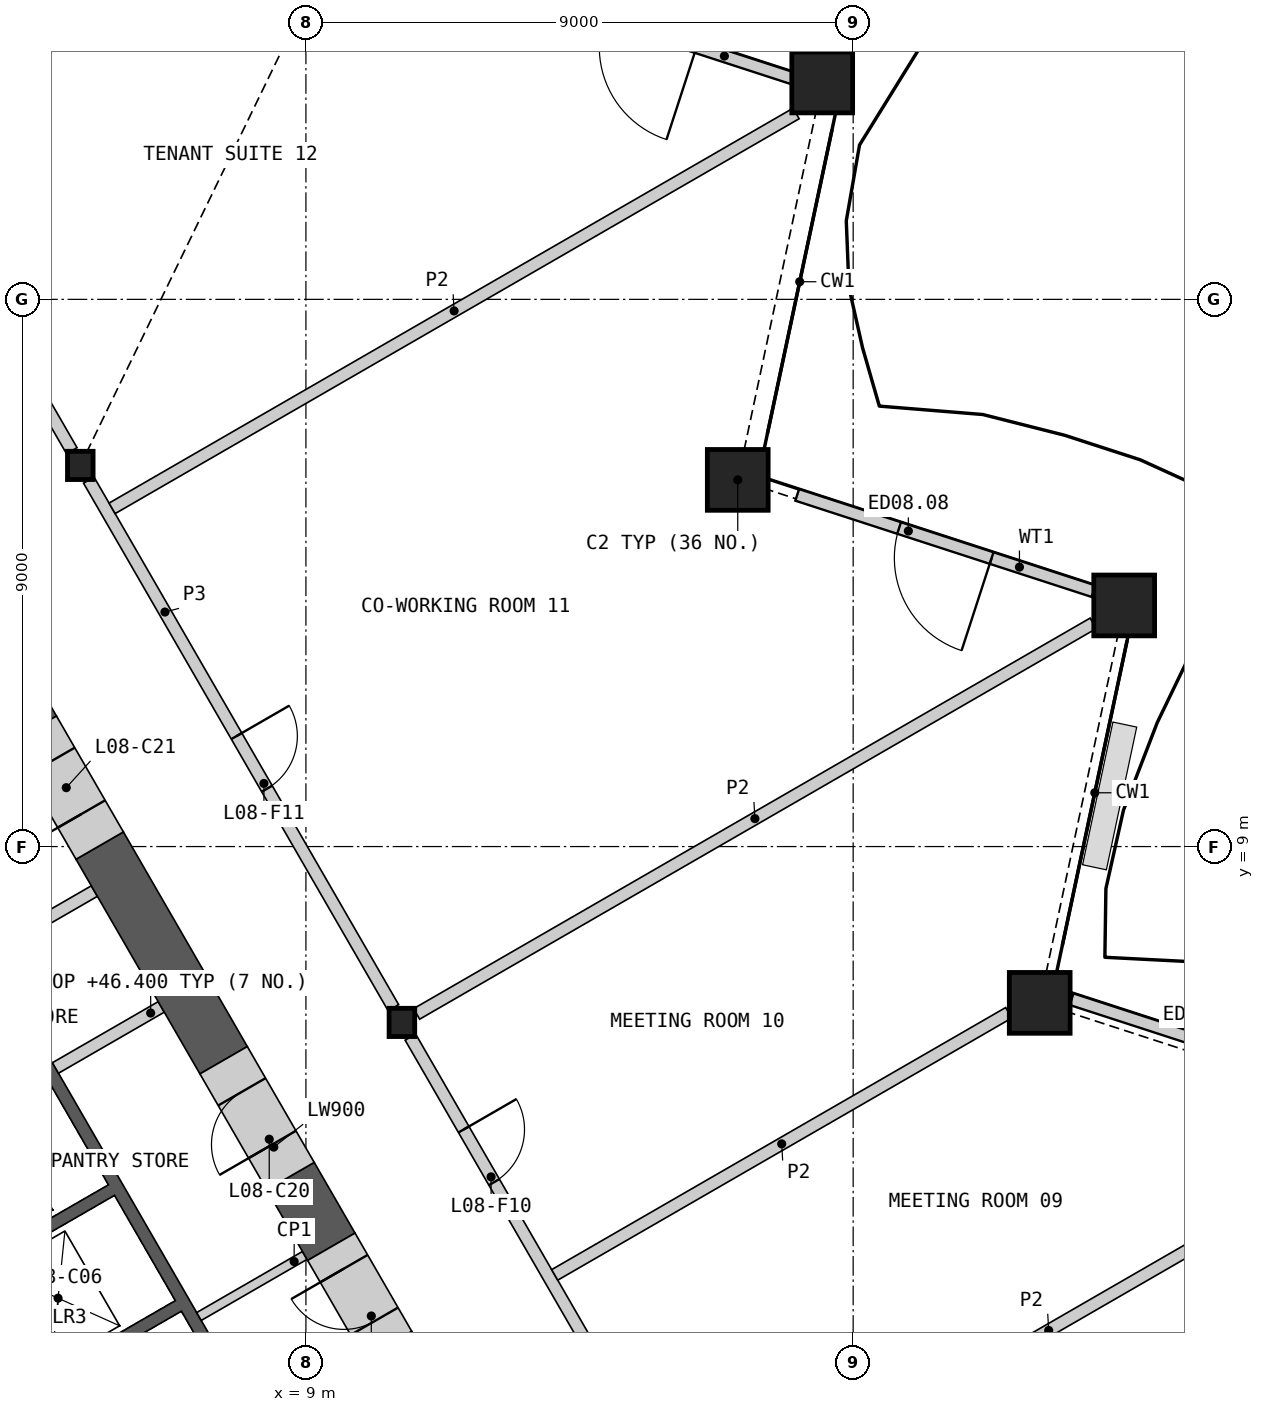
"""IFC4 building model, lengths in metres.
Left out: names, types, materials, properties, quantities, classifications, styles, units other than length and angle.
Written with IfcOpenShell. Run it as: python <this file> out.ifc"""

import sys

from ifc_helpers import new_model, si_unit, direction, frame, frame_2d, origin, origin_2d, place, context, subcontext, project, spatial, polyline, rectangle, hollow_rectangle, i_section, outline, extrude, element, fill, save


model = new_model("IFC4")
c1 = context("Model", 3, precision=1e-05, world=origin(), true_north=direction((0.0, 1.0)))
c2 = subcontext(c1, "Body", "Model", "MODEL_VIEW")
j1 = project(units=[si_unit("LENGTHUNIT", "METRE"), si_unit("PLANEANGLEUNIT", "RADIAN")], contexts=[c1])
p1 = place(None, origin())
s1 = spatial("IfcSite", under=j1, at=p1, CompositionType="ELEMENT")
p2 = place(p1, origin())
s2 = spatial("IfcBuilding", under=s1, at=p2, CompositionType="ELEMENT")
p3 = place(p2, frame((0.0, 0.0, 42.6)))
s3 = spatial("IfcBuildingStorey", under=s2, at=p3, CompositionType="ELEMENT", Elevation=42.6)
for number, where, z_axis, x_axis in (
    (1, (21.068, 6.429, 0.0), (0.0, 0.0, 1.0), (1.0, 0.0, 0.0)),
    (2, (22.457, 12.966, 0.0), (0.0, 0.0, 1.0), (1.0, 0.0, 0.0)),
    (3, (16.102, 15.031, 0.0), (0.0, 0.0, 1.0), (1.0, 0.0, 0.0)),
    (4, (17.491, 21.567, 0.0), (0.0, 0.0, 1.0), (1.0, 0.0, 0.0)),
):
    element("IfcColumn", number, at=place(p3, frame(where, z_axis=z_axis, x_axis=x_axis)), inside=s3, PredefinedType="COLUMN", context=c2, shape_type="SweptSolid", body=[
        extrude(hollow_rectangle(XDim=1.0, YDim=1.0, WallThickness=0.07, at=origin_2d()), origin(), (0.0, 0.0, 1.0), 4.2),
    ])
for number, where, z_axis, x_axis in (
    (5, (10.578, 6.107, 0.0), (0.0, 0.0, 1.0), (1.0, 0.0, 0.0)),
    (6, (5.289, 15.269, 0.0), (0.0, 0.0, 1.0), (1.0, 0.0, 0.0)),
):
    element("IfcColumn", number, at=place(p3, frame(where, z_axis=z_axis, x_axis=x_axis)), inside=s3, PredefinedType="COLUMN", context=c2, shape_type="SweptSolid", body=[
        extrude(i_section(OverallWidth=0.421, OverallDepth=0.465, WebThickness=0.045, FlangeThickness=0.072, at=origin_2d()), origin(), (0.0, 0.0, 1.0), 4.2),
    ])
p4 = place(p3, frame((26.899, 4.765, 0.0), z_axis=(0.0, 0.0, 1.0), x_axis=(-0.951054004345, 0.309024725255, 0.0)))
e7 = element("IfcWall", 7, at=p4, inside=s3, PredefinedType="SOLIDWALL", context=c2, shape_type="SweptSolid", body=[
    extrude(rectangle(XDim=5.579, YDim=0.2, at=frame_2d((2.79, 0.0))), origin(), (0.0, 0.0, 1.0), 3.189),
])
p5 = place(p4, frame((1.86, 0.0, 0.0)))
e8 = element("IfcOpeningElement", 8, at=p5, cuts=e7, PredefinedType="OPENING", context=c2, shape_type="SweptSolid", body=[
    extrude(rectangle(XDim=1.6, YDim=2.4, at=frame_2d((0.8, 1.2))), frame((0.0, 0.11, 0.0), z_axis=(0.0, -1.0, 0.0), x_axis=(1.0, 0.0, 0.0)), (0.0, 0.0, 1.0), 0.22),
])
p6 = place(p3, frame((21.953, 13.2, 0.0), z_axis=(0.0, 0.0, 1.0), x_axis=(-0.951052624268, 0.309028972547, 0.0)))
e9 = element("IfcWall", 9, at=p6, inside=s3, PredefinedType="SOLIDWALL", context=c2, shape_type="SweptSolid", body=[
    extrude(rectangle(XDim=5.124, YDim=0.2, at=frame_2d((2.562, 0.0))), origin(), (0.0, 0.0, 1.0), 3.189),
])
p7 = place(p6, frame((1.762, 0.0, 0.0)))
e10 = element("IfcOpeningElement", 10, at=p7, cuts=e9, PredefinedType="OPENING", context=c2, shape_type="SweptSolid", body=[
    extrude(rectangle(XDim=1.6, YDim=2.4, at=frame_2d((0.8, 1.2))), frame((0.0, 0.11, 0.0), z_axis=(0.0, -1.0, 0.0), x_axis=(1.0, 0.0, 0.0)), (0.0, 0.0, 1.0), 0.22),
])
p8 = place(p3, frame((17.1, 21.605, 0.0), z_axis=(0.0, 0.0, 1.0), x_axis=(-0.951048073862, 0.309042976306, 0.0)))
e11 = element("IfcWall", 11, at=p8, inside=s3, PredefinedType="SOLIDWALL", context=c2, shape_type="SweptSolid", body=[
    extrude(rectangle(XDim=5.124, YDim=0.2, at=frame_2d((2.562, 0.0))), origin(), (0.0, 0.0, 1.0), 3.189),
])
p9 = place(p8, frame((1.762, 0.0, 0.0)))
e12 = element("IfcOpeningElement", 12, at=p9, cuts=e11, PredefinedType="OPENING", context=c2, shape_type="SweptSolid", body=[
    extrude(rectangle(XDim=1.6, YDim=2.4, at=frame_2d((0.8, 1.2))), frame((0.0, 0.11, 0.0), z_axis=(0.0, -1.0, 0.0), x_axis=(1.0, 0.0, 0.0)), (0.0, 0.0, 1.0), 0.22),
])
p10 = place(p3, origin())
e13 = element("IfcWall", 13, at=p10, inside=s3, PredefinedType="SHEAR", context=c2, shape_type="SweptSolid", body=[
    extrude(outline(polyline([(2.66, 4.192), (4.831, 5.445), (8.231, -0.444), (6.061, -1.697), (5.96, -1.524), (7.952, -0.374), (6.952, 1.358), (4.96, 0.208), (4.861, 0.381), (6.852, 1.531), (5.852, 3.263), (3.861, 2.113), (3.76, 2.287), (5.752, 3.437), (4.752, 5.169), (2.76, 4.019), (2.66, 4.192)])), origin(), (0.0, 0.0, 1.0), 3.8),
])
p11 = place(p3, frame((5.817, -1.476, 0.0), z_axis=(0.0, 0.0, 1.0), x_axis=(-0.500002616675, 0.866023893041, 0.0)))
e14 = element("IfcWall", 14, at=p11, inside=s3, PredefinedType="SOLIDWALL", context=c2, shape_type="SweptSolid", body=[
    extrude(rectangle(XDim=8.373, YDim=0.2, at=frame_2d((4.187, 0.0))), origin(), (0.0, 0.0, 1.0), 3.8),
])
p12 = place(p11, frame((0.337, 0.0, 0.0)))
e15 = element("IfcOpeningElement", 15, at=p12, cuts=e14, PredefinedType="OPENING", context=c2, shape_type="SweptSolid", body=[
    extrude(rectangle(XDim=1.1, YDim=2.1, at=frame_2d((0.55, 1.05))), frame((0.0, 0.11, 0.0), z_axis=(0.0, -1.0, 0.0), x_axis=(1.0, 0.0, 0.0)), (0.0, 0.0, 1.0), 0.22),
])
p13 = place(p11, frame((2.537, 0.0, 0.0)))
e16 = element("IfcOpeningElement", 16, at=p13, cuts=e14, PredefinedType="OPENING", context=c2, shape_type="SweptSolid", body=[
    extrude(rectangle(XDim=1.1, YDim=2.1, at=frame_2d((0.55, 1.05))), frame((0.0, 0.11, 0.0), z_axis=(0.0, -1.0, 0.0), x_axis=(1.0, 0.0, 0.0)), (0.0, 0.0, 1.0), 0.22),
])
p14 = place(p11, frame((4.737, 0.0, 0.0)))
e17 = element("IfcOpeningElement", 17, at=p14, cuts=e14, PredefinedType="OPENING", context=c2, shape_type="SweptSolid", body=[
    extrude(rectangle(XDim=1.1, YDim=2.1, at=frame_2d((0.55, 1.05))), frame((0.0, 0.11, 0.0), z_axis=(0.0, -1.0, 0.0), x_axis=(1.0, 0.0, 0.0)), (0.0, 0.0, 1.0), 0.22),
])
p15 = place(p11, frame((7.037, 0.0, 0.0)))
e18 = element("IfcOpeningElement", 18, at=p15, cuts=e14, PredefinedType="OPENING", context=c2, shape_type="SweptSolid", body=[
    extrude(rectangle(XDim=0.9, YDim=2.1, at=frame_2d((0.45, 1.05))), frame((0.0, 0.11, 0.0), z_axis=(0.0, -1.0, 0.0), x_axis=(1.0, 0.0, 0.0)), (0.0, 0.0, 1.0), 0.22),
])
p16 = place(p3, frame((4.881, 5.358, 0.0), z_axis=(0.0, 0.0, 1.0), x_axis=(0.866035824272, 0.499981950752, 0.0)))
e19 = element("IfcWall", 19, at=p16, inside=s3, PredefinedType="SHEAR", context=c2, shape_type="SweptSolid", body=[
    extrude(rectangle(XDim=2.009, YDim=0.2, at=frame_2d((1.004, 0.0))), origin(), (0.0, 0.0, 1.0), 3.8),
])
p17 = place(p3, frame((3.781, 7.263, 0.0), z_axis=(0.0, 0.0, 1.0), x_axis=(0.865983199114, 0.50007309351, 0.0)))
e20 = element("IfcWall", 20, at=p17, inside=s3, PredefinedType="SHEAR", context=c2, shape_type="SweptSolid", body=[
    extrude(rectangle(XDim=2.009, YDim=0.2, at=frame_2d((1.004, 0.0))), origin(), (0.0, 0.0, 1.0), 3.8),
])
p18 = place(p3, frame((8.981, 2.275, 0.0), z_axis=(0.0, 0.0, 1.0), x_axis=(-0.866013584312, -0.500020471368, 0.0)))
e21 = element("IfcWall", 21, at=p18, inside=s3, PredefinedType="PARTITIONING", context=c2, shape_type="SweptSolid", body=[
    extrude(rectangle(XDim=2.009, YDim=0.15, at=frame_2d((1.005, 0.0))), origin(), (0.0, 0.0, 1.0), 3.8),
])
p19 = place(p3, frame((7.646, 5.486, 0.0), z_axis=(0.0, 0.0, 1.0), x_axis=(-0.499978218965, 0.866037978706, 0.0)))
e22 = element("IfcWall", 22, at=p19, inside=s3, PredefinedType="SHEAR", context=c2, shape_type="SweptSolid", body=[
    extrude(rectangle(XDim=4.076, YDim=0.9, at=frame_2d((2.038, 0.0))), origin(), (0.0, 0.0, 1.0), 3.8),
])
p20 = place(p3, frame((4.509, 10.921, 0.0), z_axis=(0.0, 0.0, 1.0), x_axis=(-0.49999004381, 0.866031151917, 0.0)))
e23 = element("IfcWall", 23, at=p20, inside=s3, PredefinedType="SHEAR", context=c2, shape_type="SweptSolid", body=[
    extrude(rectangle(XDim=3.975, YDim=0.9, at=frame_2d((1.988, 0.0))), origin(), (0.0, 0.0, 1.0), 3.8),
])
p21 = place(p3, frame((11.755, -1.63, 0.0), z_axis=(0.0, 0.0, 1.0), x_axis=(-0.499943114462, 0.866058244174, 0.0)))
e24 = element("IfcWall", 24, at=p21, inside=s3, PredefinedType="SHEAR", context=c2, shape_type="SweptSolid", body=[
    extrude(rectangle(XDim=2.809, YDim=0.9, at=frame_2d((1.405, 0.0))), origin(), (0.0, 0.0, 1.0), 3.8),
])
p22 = place(p3, frame((9.418, 2.418, 0.0), z_axis=(0.0, 0.0, 1.0), x_axis=(-0.49995335277, 0.8660523339, 0.0)))
e25 = element("IfcWall", 25, at=p22, inside=s3, PredefinedType="SHEAR", context=c2, shape_type="SweptSolid", body=[
    extrude(rectangle(XDim=1.343, YDim=0.9, at=frame_2d((0.671, 0.0))), origin(), (0.0, 0.0, 1.0), 3.8),
])
p23 = place(p3, frame((10.35, 0.803, 0.0), z_axis=(0.0, 0.0, 1.0), x_axis=(-0.500081290722, 0.865978465477, 0.0)))
e26 = element("IfcWall", 26, at=p23, inside=s3, PredefinedType="SHEAR", context=c2, shape_type="SweptSolid", body=[
    extrude(rectangle(XDim=1.865, YDim=0.9, at=frame_2d((0.933, 0.0))), origin(), (0.0, 0.0, 1.0), 3.8),
])
p24 = place(p23, frame((0.45, 0.0, 0.0)))
e27 = element("IfcOpeningElement", 27, at=p24, cuts=e26, PredefinedType="OPENING", context=c2, shape_type="SweptSolid", body=[
    extrude(rectangle(XDim=1.0, YDim=2.1, at=frame_2d((0.5, 1.05))), frame((0.0, 0.46, 0.0), z_axis=(0.0, -1.0, 0.0), x_axis=(1.0, 0.0, 0.0)), (0.0, 0.0, 1.0), 0.92),
])
p25 = place(p3, frame((8.747, 3.58, 0.0), z_axis=(0.0, 0.0, 1.0), x_axis=(-0.50002983664, 0.866008176907, 0.0)))
e28 = element("IfcWall", 28, at=p25, inside=s3, PredefinedType="SHEAR", context=c2, shape_type="SweptSolid", body=[
    extrude(rectangle(XDim=2.2, YDim=0.9, at=frame_2d((1.1, 0.0))), origin(), (0.0, 0.0, 1.0), 3.8),
])
p26 = place(p25, frame((0.6, 0.0, 0.0)))
e29 = element("IfcOpeningElement", 29, at=p26, cuts=e28, PredefinedType="OPENING", context=c2, shape_type="SweptSolid", body=[
    extrude(rectangle(XDim=1.0, YDim=2.1, at=frame_2d((0.5, 1.05))), frame((0.0, 0.46, 0.0), z_axis=(0.0, -1.0, 0.0), x_axis=(1.0, 0.0, 0.0)), (0.0, 0.0, 1.0), 0.92),
])
p27 = place(p3, frame((5.608, 9.016, 0.0), z_axis=(0.0, 0.0, 1.0), x_axis=(-0.499994660107, 0.866028486751, 0.0)))
e30 = element("IfcWall", 30, at=p27, inside=s3, PredefinedType="SHEAR", context=c2, shape_type="SweptSolid", body=[
    extrude(rectangle(XDim=2.2, YDim=0.9, at=frame_2d((1.1, 0.0))), origin(), (0.0, 0.0, 1.0), 3.8),
])
p28 = place(p27, frame((0.6, 0.0, 0.0)))
e31 = element("IfcOpeningElement", 31, at=p28, cuts=e30, PredefinedType="OPENING", context=c2, shape_type="SweptSolid", body=[
    extrude(rectangle(XDim=1.0, YDim=2.1, at=frame_2d((0.5, 1.05))), frame((0.0, 0.46, 0.0), z_axis=(0.0, -1.0, 0.0), x_axis=(1.0, 0.0, 0.0)), (0.0, 0.0, 1.0), 0.92),
])
p29 = place(p3, frame((10.719, 5.865, 0.0), z_axis=(0.0, 0.0, 1.0), x_axis=(0.49999175339, -0.866030164915, 0.0)))
e32 = element("IfcWall", 32, at=p29, inside=s3, PredefinedType="PARTITIONING", context=c2, shape_type="SweptSolid", body=[
    extrude(rectangle(XDim=10.019, YDim=0.2, at=frame_2d((5.009, 0.0))), origin(), (0.0, 0.0, 1.0), 3.8),
])
p30 = place(p29, frame((6.464, 0.0, 0.0)))
e33 = element("IfcOpeningElement", 33, at=p30, cuts=e32, PredefinedType="OPENING", context=c2, shape_type="SweptSolid", body=[
    extrude(rectangle(XDim=1.0, YDim=2.1, at=frame_2d((0.5, 1.05))), frame((0.0, 0.11, 0.0), z_axis=(0.0, -1.0, 0.0), x_axis=(1.0, 0.0, 0.0)), (0.0, 0.0, 1.0), 0.22),
])
p31 = place(p29, frame((1.753, 0.0, 0.0)))
e34 = element("IfcOpeningElement", 34, at=p31, cuts=e32, PredefinedType="OPENING", context=c2, shape_type="SweptSolid", body=[
    extrude(rectangle(XDim=1.0, YDim=2.1, at=frame_2d((0.5, 1.05))), frame((0.0, 0.11, 0.0), z_axis=(0.0, -1.0, 0.0), x_axis=(1.0, 0.0, 0.0)), (0.0, 0.0, 1.0), 0.22),
])
p32 = place(p3, frame((5.429, 15.026, 0.0), z_axis=(0.0, 0.0, 1.0), x_axis=(0.50001002959, -0.86601961312, 0.0)))
e35 = element("IfcWall", 35, at=p32, inside=s3, PredefinedType="PARTITIONING", context=c2, shape_type="SweptSolid", body=[
    extrude(rectangle(XDim=10.019, YDim=0.2, at=frame_2d((5.009, 0.0))), origin(), (0.0, 0.0, 1.0), 3.8),
])
p33 = place(p32, frame((4.86, 0.0, 0.0)))
e36 = element("IfcOpeningElement", 36, at=p33, cuts=e35, PredefinedType="OPENING", context=c2, shape_type="SweptSolid", body=[
    extrude(rectangle(XDim=1.0, YDim=2.1, at=frame_2d((0.5, 1.05))), frame((0.0, 0.11, 0.0), z_axis=(0.0, -1.0, 0.0), x_axis=(1.0, 0.0, 0.0)), (0.0, 0.0, 1.0), 0.22),
])
p34 = place(p3, frame((1.913, 21.116, 0.0), z_axis=(0.0, 0.0, 1.0), x_axis=(0.500001069878, -0.866024786089, 0.0)))
e37 = element("IfcWall", 37, at=p34, inside=s3, PredefinedType="PARTITIONING", context=c2, shape_type="SweptSolid", body=[
    extrude(rectangle(XDim=6.473, YDim=0.2, at=frame_2d((3.236, 0.0))), origin(), (0.0, 0.0, 1.0), 3.8),
])
p35 = place(p34, frame((2.787, 0.0, 0.0)))
e38 = element("IfcOpeningElement", 38, at=p35, cuts=e37, PredefinedType="OPENING", context=c2, shape_type="SweptSolid", body=[
    extrude(rectangle(XDim=1.0, YDim=2.1, at=frame_2d((0.5, 1.05))), frame((0.0, 0.11, 0.0), z_axis=(0.0, -1.0, 0.0), x_axis=(1.0, 0.0, 0.0)), (0.0, 0.0, 1.0), 0.22),
])
p36 = place(p3, frame((2.041, 21.093, 0.0), z_axis=(0.0, 0.0, 1.0), x_axis=(0.778730857737, 0.627358152261, 0.0)))
e39 = element("IfcWall", 39, at=p36, inside=s3, PredefinedType="PARTITIONING", context=c2, shape_type="SweptSolid", body=[
    extrude(rectangle(XDim=13.654, YDim=0.2, at=frame_2d((6.827, 0.0))), origin(), (0.0, 0.0, 1.0), 2.885),
])
p37 = place(p3, frame((15.518, -2.248, 0.0), z_axis=(0.0, 0.0, 1.0), x_axis=(0.866025231175, 0.500000298968, 0.0)))
e40 = element("IfcWall", 40, at=p37, inside=s3, PredefinedType="PARTITIONING", context=c2, shape_type="SweptSolid", body=[
    extrude(rectangle(XDim=13.159, YDim=0.2, at=frame_2d((6.579, 0.0))), origin(), (0.0, 0.0, 1.0), 2.885),
])
p38 = place(p3, frame((5.812, 14.562, 0.0), z_axis=(0.0, 0.0, 1.0), x_axis=(0.866020631549, 0.500008265664, 0.0)))
e41 = element("IfcWall", 41, at=p38, inside=s3, PredefinedType="PARTITIONING", context=c2, shape_type="SweptSolid", body=[
    extrude(rectangle(XDim=12.989, YDim=0.2, at=frame_2d((6.495, 0.0))), origin(), (0.0, 0.0, 1.0), 2.885),
])
p39 = place(p3, frame((10.821, 6.247, 0.0), z_axis=(0.0, 0.0, 1.0), x_axis=(0.866026729935, 0.499997703033, 0.0)))
e42 = element("IfcWall", 42, at=p39, inside=s3, PredefinedType="PARTITIONING", context=c2, shape_type="SweptSolid", body=[
    extrude(rectangle(XDim=12.848, YDim=0.2, at=frame_2d((6.424, 0.0))), origin(), (0.0, 0.0, 1.0), 2.885),
])
p40 = place(p3, frame((13.091, 1.955, 0.0), z_axis=(0.0, 0.0, 1.0), x_axis=(0.866026670206, 0.499997806488, 0.0)))
e43 = element("IfcWall", 43, at=p40, inside=s3, PredefinedType="PARTITIONING", context=c2, shape_type="SweptSolid", body=[
    extrude(rectangle(XDim=8.622, YDim=0.2, at=frame_2d((4.311, 0.0))), origin(), (0.0, 0.0, 1.0), 2.885),
])
p41 = place(p7, origin())
e44 = element("IfcDoor", 44, at=p41, inside=s3, OperationType="DOUBLE_DOOR_SINGLE_SWING", PredefinedType="DOOR", context=c2, shape_type="SweptSolid", body=[
    extrude(rectangle(XDim=1.6, YDim=2.4, at=frame_2d((0.8, 1.2))), frame((0.0, 0.025, 0.0), z_axis=(0.0, -1.0, 0.0), x_axis=(1.0, 0.0, 0.0)), (0.0, 0.0, 1.0), 0.05),
])
fill(e10, e44)
p42 = place(p24, origin())
e45 = element("IfcDoor", 45, at=p42, inside=s3, OperationType="SINGLE_SWING_RIGHT", PredefinedType="DOOR", context=c2, shape_type="SweptSolid", body=[
    extrude(rectangle(XDim=1.0, YDim=2.1, at=frame_2d((0.5, 1.05))), frame((0.0, 0.205, 0.0), z_axis=(0.0, -1.0, 0.0), x_axis=(1.0, 0.0, 0.0)), (0.0, 0.0, 1.0), 0.05),
])
fill(e27, e45)
p43 = place(p26, origin())
e46 = element("IfcDoor", 46, at=p43, inside=s3, OperationType="SINGLE_SWING_LEFT", PredefinedType="DOOR", context=c2, shape_type="SweptSolid", body=[
    extrude(rectangle(XDim=1.0, YDim=2.1, at=frame_2d((0.5, 1.05))), frame((0.0, 0.205, 0.0), z_axis=(0.0, -1.0, 0.0), x_axis=(1.0, 0.0, 0.0)), (0.0, 0.0, 1.0), 0.05),
])
fill(e29, e46)
p44 = place(p28, origin())
e47 = element("IfcDoor", 47, at=p44, inside=s3, OperationType="SINGLE_SWING_LEFT", PredefinedType="DOOR", context=c2, shape_type="SweptSolid", body=[
    extrude(rectangle(XDim=1.0, YDim=2.1, at=frame_2d((0.5, 1.05))), frame((0.0, 0.205, 0.0), z_axis=(0.0, -1.0, 0.0), x_axis=(1.0, 0.0, 0.0)), (0.0, 0.0, 1.0), 0.05),
])
fill(e31, e47)
p45 = place(p31, origin())
e48 = element("IfcDoor", 48, at=p45, inside=s3, OperationType="SINGLE_SWING_LEFT", PredefinedType="DOOR", context=c2, shape_type="SweptSolid", body=[
    extrude(rectangle(XDim=1.0, YDim=2.1, at=frame_2d((0.5, 1.05))), frame((0.0, 0.025, 0.0), z_axis=(0.0, -1.0, 0.0), x_axis=(1.0, 0.0, 0.0)), (0.0, 0.0, 1.0), 0.05),
])
fill(e34, e48)
p46 = place(p33, origin())
e49 = element("IfcDoor", 49, at=p46, inside=s3, OperationType="SINGLE_SWING_LEFT", PredefinedType="DOOR", context=c2, shape_type="SweptSolid", body=[
    extrude(rectangle(XDim=1.0, YDim=2.1, at=frame_2d((0.5, 1.05))), frame((0.0, 0.025, 0.0), z_axis=(0.0, -1.0, 0.0), x_axis=(1.0, 0.0, 0.0)), (0.0, 0.0, 1.0), 0.05),
])
fill(e36, e49)
save(model, sys.argv[1])
